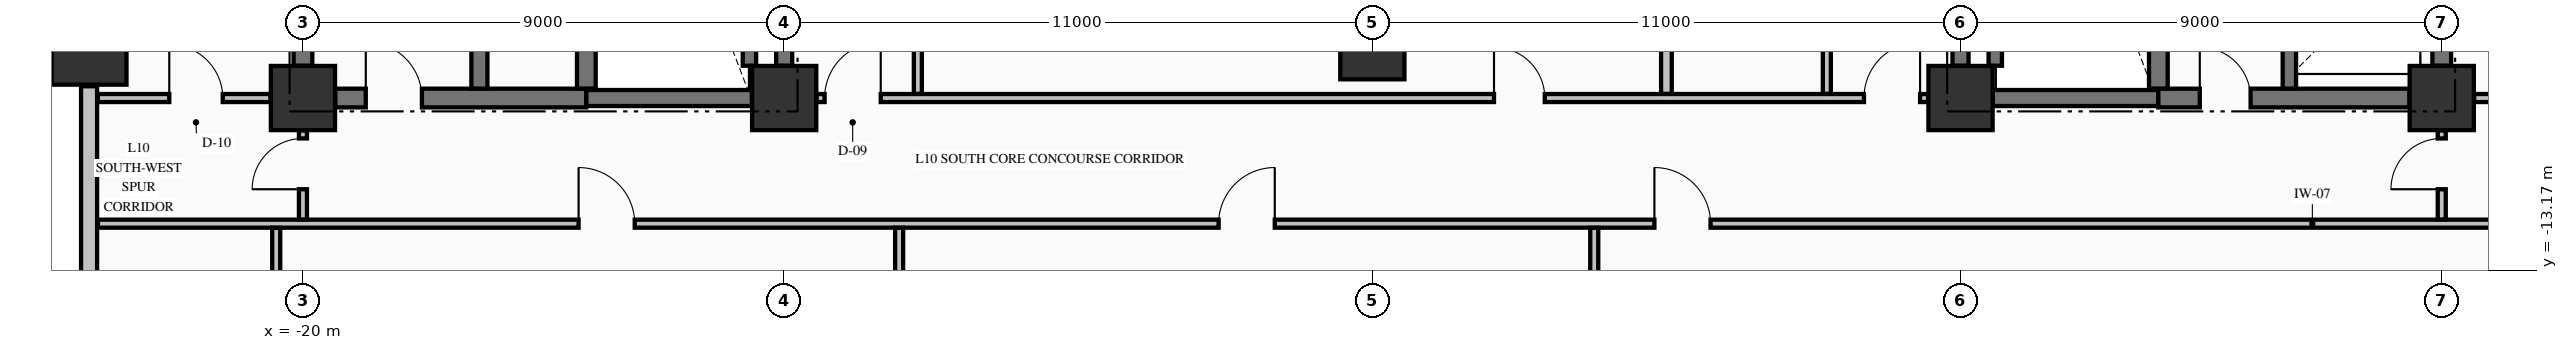
"""IFC4 building model, lengths in metres.
Left out: names, types, materials, properties, quantities, classifications, styles, units other than length and angle.
Written with IfcOpenShell. Run it as: python <this file> out.ifc"""

import sys

from ifc_helpers import new_model, si_unit, direction, frame, frame_2d, origin, origin_2d, place, context, subcontext, project, spatial, rectangle, extrude, element, fill, save


model = new_model("IFC4")
c1 = context("Model", 3, precision=1e-05, world=origin(), true_north=direction((0.0, 1.0)))
c2 = subcontext(c1, "Body", "Model", "MODEL_VIEW")
j1 = project(units=[si_unit("LENGTHUNIT", "METRE"), si_unit("PLANEANGLEUNIT", "RADIAN")], contexts=[c1])
p1 = place(None, origin())
s1 = spatial("IfcSite", under=j1, at=p1, CompositionType="ELEMENT")
p2 = place(p1, origin())
s2 = spatial("IfcBuilding", under=s1, at=p2, CompositionType="ELEMENT")
p3 = place(p2, frame((0.0, 0.0, 45.05)))
s3 = spatial("IfcBuildingStorey", under=s2, at=p3, CompositionType="ELEMENT", Elevation=45.05)
p4 = place(p3, frame((-24.0, -9.0, -0.25), z_axis=(0.0, 0.0, 1.0), x_axis=(1.0, 0.0, 0.0)))
e1 = element("IfcColumn", 1, at=p4, inside=s3, PredefinedType="COLUMN", context=c2, shape_type="SweptSolid", body=[
    extrude(rectangle(XDim=1.4, YDim=1.4, at=origin_2d()), origin(), (0.0, 0.0, 1.0), 3.57),
])
for number, where, z_axis, x_axis in (
    (2, (-20.0, -9.95, -0.25), (0.0, 0.0, 1.0), (1.0, 0.0, 0.0)),
    (3, (-11.0, -9.95, -0.25), (0.0, 0.0, 1.0), (1.0, 0.0, 0.0)),
    (4, (11.0, -9.95, -0.25), (0.0, 0.0, 1.0), (1.0, 0.0, 0.0)),
    (5, (20.0, -9.95, -0.25), (0.0, 0.0, 1.0), (1.0, 0.0, 0.0)),
    (6, (0.0, -9.0, -0.25), (0.0, 0.0, 1.0), (1.0, 0.0, 0.0)),
):
    element("IfcColumn", number, at=place(p3, frame(where, z_axis=z_axis, x_axis=x_axis)), inside=s3, PredefinedType="COLUMN", context=c2, shape_type="SweptSolid", body=[
        extrude(rectangle(XDim=1.2, YDim=1.2, at=origin_2d()), origin(), (0.0, 0.0, 1.0), 3.57),
    ])
p5 = place(p3, frame((-24.0, -9.73, 0.0), z_axis=(0.0, 0.0, 1.0), x_axis=(0.0, -1.0, 0.0)))
e7 = element("IfcWall", 7, at=p5, inside=s3, PredefinedType="STANDARD", context=c2, shape_type="SweptSolid", body=[
    extrude(rectangle(XDim=12.54, YDim=0.3, at=frame_2d((6.27, 0.0))), origin(), (0.0, 0.0, 1.0), 2.712),
])
p6 = place(p3, frame((-19.396, -9.95, 0.0), z_axis=(0.0, 0.0, 1.0), x_axis=(1.0, 0.0, 0.0)))
e8 = element("IfcWall", 8, at=p6, inside=s3, PredefinedType="SHEAR", context=c2, shape_type="SweptSolid", body=[
    extrude(rectangle(XDim=4.696, YDim=0.35, at=frame_2d((2.348, 0.0))), origin(), (0.0, 0.0, 1.0), 3.32),
])
p7 = place(p6, frame((0.571, 0.0, 0.0)))
e9 = element("IfcOpeningElement", 9, at=p7, cuts=e8, PredefinedType="OPENING", context=c2, shape_type="SweptSolid", body=[
    extrude(rectangle(XDim=1.05, YDim=2.15, at=frame_2d((0.525, 1.075))), frame((0.0, 0.185, 0.0), z_axis=(0.0, -1.0, 0.0), x_axis=(1.0, 0.0, 0.0)), (0.0, 0.0, 1.0), 0.37),
])
for number, where, z_axis, x_axis in (
    (10, (-14.7, -9.95, 0.0), (0.0, 0.0, 1.0), (1.0, 0.0, 0.0)),
    (11, (11.604, -9.95, 0.0), (0.0, 0.0, 1.0), (1.0, 0.0, 0.0)),
):
    element("IfcWall", number, at=place(p3, frame(where, z_axis=z_axis, x_axis=x_axis)), inside=s3, PredefinedType="SHEAR", context=c2, shape_type="SweptSolid", body=[
        extrude(rectangle(XDim=3.096, YDim=0.3, at=frame_2d((1.548, 0.0))), origin(), (0.0, 0.0, 1.0), 3.32),
    ])
p8 = place(p3, frame((14.7, -9.95, 0.0), z_axis=(0.0, 0.0, 1.0), x_axis=(1.0, 0.0, 0.0)))
e12 = element("IfcWall", 12, at=p8, inside=s3, PredefinedType="SHEAR", context=c2, shape_type="SweptSolid", body=[
    extrude(rectangle(XDim=4.696, YDim=0.35, at=frame_2d((2.348, 0.0))), origin(), (0.0, 0.0, 1.0), 3.32),
])
p9 = place(p8, frame((0.775, 0.0, 0.0)))
e13 = element("IfcOpeningElement", 13, at=p9, cuts=e12, PredefinedType="OPENING", context=c2, shape_type="SweptSolid", body=[
    extrude(rectangle(XDim=0.95, YDim=2.15, at=frame_2d((0.475, 1.075))), frame((0.0, 0.185, 0.0), z_axis=(0.0, -1.0, 0.0), x_axis=(1.0, 0.0, 0.0)), (0.0, 0.0, 1.0), 0.37),
])
p10 = place(p3, frame((-23.835, -12.3, 0.0), z_axis=(0.0, 0.0, 1.0), x_axis=(1.0, 0.0, 0.0)))
e14 = element("IfcWall", 14, at=p10, inside=s3, PredefinedType="PARTITIONING", context=c2, shape_type="SweptSolid", body=[
    extrude(rectangle(XDim=52.67, YDim=0.15, at=frame_2d((26.335, 0.0))), origin(), (0.0, 0.0, 1.0), 3.32),
])
p11 = place(p10, frame((8.99, 0.0, 0.0)))
e15 = element("IfcOpeningElement", 15, at=p11, cuts=e14, PredefinedType="OPENING", context=c2, shape_type="SweptSolid", body=[
    extrude(rectangle(XDim=1.05, YDim=2.15, at=frame_2d((0.525, 1.075))), frame((0.0, 0.085, 0.0), z_axis=(0.0, -1.0, 0.0), x_axis=(1.0, 0.0, 0.0)), (0.0, 0.0, 1.0), 0.17),
])
p12 = place(p10, frame((20.96, 0.0, 0.0)))
e16 = element("IfcOpeningElement", 16, at=p12, cuts=e14, PredefinedType="OPENING", context=c2, shape_type="SweptSolid", body=[
    extrude(rectangle(XDim=1.05, YDim=2.15, at=frame_2d((0.525, 1.075))), frame((0.0, 0.085, 0.0), z_axis=(0.0, -1.0, 0.0), x_axis=(1.0, 0.0, 0.0)), (0.0, 0.0, 1.0), 0.17),
])
p13 = place(p10, frame((29.11, 0.0, 0.0)))
e17 = element("IfcOpeningElement", 17, at=p13, cuts=e14, PredefinedType="OPENING", context=c2, shape_type="SweptSolid", body=[
    extrude(rectangle(XDim=1.05, YDim=2.15, at=frame_2d((0.525, 1.075))), frame((0.0, 0.085, 0.0), z_axis=(0.0, -1.0, 0.0), x_axis=(1.0, 0.0, 0.0)), (0.0, 0.0, 1.0), 0.17),
])
p14 = place(p3, frame((-23.835, -9.95, 0.0), z_axis=(0.0, 0.0, 1.0), x_axis=(1.0, 0.0, 0.0)))
e18 = element("IfcWall", 18, at=p14, inside=s3, PredefinedType="PARTITIONING", context=c2, shape_type="SweptSolid", body=[
    extrude(rectangle(XDim=3.229, YDim=0.15, at=frame_2d((1.615, 0.0))), origin(), (0.0, 0.0, 1.0), 3.32),
])
p15 = place(p14, frame((1.335, 0.0, 0.0)))
e19 = element("IfcOpeningElement", 19, at=p15, cuts=e18, PredefinedType="OPENING", context=c2, shape_type="SweptSolid", body=[
    extrude(rectangle(XDim=1.0, YDim=2.15, at=frame_2d((0.5, 1.075))), frame((0.0, 0.085, 0.0), z_axis=(0.0, -1.0, 0.0), x_axis=(1.0, 0.0, 0.0)), (0.0, 0.0, 1.0), 0.17),
])
p16 = place(p3, frame((-10.394, -9.95, 0.0), z_axis=(0.0, 0.0, 1.0), x_axis=(1.0, 0.0, 0.0)))
e20 = element("IfcWall", 20, at=p16, inside=s3, PredefinedType="PARTITIONING", context=c2, shape_type="SweptSolid", body=[
    extrude(rectangle(XDim=20.788, YDim=0.15, at=frame_2d((10.394, 0.0))), origin(), (0.0, 0.0, 1.0), 3.32),
])
p17 = place(p16, frame((0.15, 0.0, 0.0)))
e21 = element("IfcOpeningElement", 21, at=p17, cuts=e20, PredefinedType="OPENING", context=c2, shape_type="SweptSolid", body=[
    extrude(rectangle(XDim=1.05, YDim=2.15, at=frame_2d((0.525, 1.075))), frame((0.0, 0.085, 0.0), z_axis=(0.0, -1.0, 0.0), x_axis=(1.0, 0.0, 0.0)), (0.0, 0.0, 1.0), 0.17),
])
p18 = place(p16, frame((19.588, 0.0, 0.0)))
e22 = element("IfcOpeningElement", 22, at=p18, cuts=e20, PredefinedType="OPENING", context=c2, shape_type="SweptSolid", body=[
    extrude(rectangle(XDim=1.05, YDim=2.15, at=frame_2d((0.525, 1.075))), frame((0.0, 0.085, 0.0), z_axis=(0.0, -1.0, 0.0), x_axis=(1.0, 0.0, 0.0)), (0.0, 0.0, 1.0), 0.17),
])
p19 = place(p16, frame((12.669, 0.0, 0.0)))
e23 = element("IfcOpeningElement", 23, at=p19, cuts=e20, PredefinedType="OPENING", context=c2, shape_type="SweptSolid", body=[
    extrude(rectangle(XDim=0.95, YDim=2.15, at=frame_2d((0.475, 1.075))), frame((0.0, 0.085, 0.0), z_axis=(0.0, -1.0, 0.0), x_axis=(1.0, 0.0, 0.0)), (0.0, 0.0, 1.0), 0.17),
])
p20 = place(p3, frame((20.606, -9.95, 0.0), z_axis=(0.0, 0.0, 1.0), x_axis=(1.0, 0.0, 0.0)))
e24 = element("IfcWall", 24, at=p20, inside=s3, PredefinedType="PARTITIONING", context=c2, shape_type="SweptSolid", body=[
    extrude(rectangle(XDim=8.229, YDim=0.15, at=frame_2d((4.115, 0.0))), origin(), (0.0, 0.0, 1.0), 3.32),
])
p21 = place(p20, frame((3.419, 0.0, 0.0)))
e25 = element("IfcOpeningElement", 25, at=p21, cuts=e24, PredefinedType="OPENING", context=c2, shape_type="SweptSolid", body=[
    extrude(rectangle(XDim=0.95, YDim=2.15, at=frame_2d((0.475, 1.075))), frame((0.0, 0.085, 0.0), z_axis=(0.0, -1.0, 0.0), x_axis=(1.0, 0.0, 0.0)), (0.0, 0.0, 1.0), 0.17),
])
p22 = place(p3, frame((-20.0, -9.346, 0.0), z_axis=(0.0, 0.0, 1.0), x_axis=(0.0, 1.0, 0.0)))
e26 = element("IfcWall", 26, at=p22, inside=s3, PredefinedType="SHEAR", context=c2, shape_type="SweptSolid", body=[
    extrude(rectangle(XDim=8.742, YDim=0.35, at=frame_2d((4.371, 0.0))), origin(), (0.0, 0.0, 1.0), 3.32),
])
p23 = place(p3, frame((-16.7, -9.773, 0.0), z_axis=(0.0, 0.0, 1.0), x_axis=(0.0, 1.0, 0.0)))
e27 = element("IfcWall", 27, at=p23, inside=s3, PredefinedType="SHEAR", context=c2, shape_type="SweptSolid", body=[
    extrude(rectangle(XDim=9.371, YDim=0.3, at=frame_2d((4.686, 0.0))), origin(), (0.0, 0.0, 1.0), 3.32),
])
p24 = place(p3, frame((-14.7, -9.773, 0.0), z_axis=(0.0, 0.0, 1.0), x_axis=(0.0, 1.0, 0.0)))
e28 = element("IfcWall", 28, at=p24, inside=s3, PredefinedType="SHEAR", context=c2, shape_type="SweptSolid", body=[
    extrude(rectangle(XDim=9.371, YDim=0.35, at=frame_2d((4.686, 0.0))), origin(), (0.0, 0.0, 1.0), 3.32),
])
p25 = place(p3, frame((-11.65, -9.346, 0.0), z_axis=(0.0, 0.0, 1.0), x_axis=(0.0, 1.0, 0.0)))
e29 = element("IfcWall", 29, at=p25, inside=s3, PredefinedType="SOLIDWALL", context=c2, shape_type="SweptSolid", body=[
    extrude(rectangle(XDim=8.742, YDim=0.25, at=frame_2d((4.371, 0.0))), origin(), (0.0, 0.0, 1.0), 3.32),
])
for number, where, z_axis, x_axis in (
    (30, (-11.0, -9.346, 0.0), (0.0, 0.0, 1.0), (0.0, 1.0, 0.0)),
    (31, (11.0, -9.346, 0.0), (0.0, 0.0, 1.0), (0.0, 1.0, 0.0)),
):
    element("IfcWall", number, at=place(p3, frame(where, z_axis=z_axis, x_axis=x_axis)), inside=s3, PredefinedType="SHEAR", context=c2, shape_type="SweptSolid", body=[
        extrude(rectangle(XDim=8.742, YDim=0.3, at=frame_2d((4.371, 0.0))), origin(), (0.0, 0.0, 1.0), 3.32),
    ])
p26 = place(p3, frame((11.65, -9.346, 0.0), z_axis=(0.0, 0.0, 1.0), x_axis=(0.0, 1.0, 0.0)))
e32 = element("IfcWall", 32, at=p26, inside=s3, PredefinedType="SOLIDWALL", context=c2, shape_type="SweptSolid", body=[
    extrude(rectangle(XDim=8.742, YDim=0.25, at=frame_2d((4.371, 0.0))), origin(), (0.0, 0.0, 1.0), 3.32),
])
p27 = place(p3, frame((14.7, -9.773, 0.0), z_axis=(0.0, 0.0, 1.0), x_axis=(0.0, 1.0, 0.0)))
e33 = element("IfcWall", 33, at=p27, inside=s3, PredefinedType="SHEAR", context=c2, shape_type="SweptSolid", body=[
    extrude(rectangle(XDim=9.371, YDim=0.35, at=frame_2d((4.686, 0.0))), origin(), (0.0, 0.0, 1.0), 3.32),
])
p28 = place(p3, frame((17.15, -9.773, 0.0), z_axis=(0.0, 0.0, 1.0), x_axis=(0.0, 1.0, 0.0)))
e34 = element("IfcWall", 34, at=p28, inside=s3, PredefinedType="SOLIDWALL", context=c2, shape_type="SweptSolid", body=[
    extrude(rectangle(XDim=2.596, YDim=0.25, at=frame_2d((1.298, 0.0))), origin(), (0.0, 0.0, 1.0), 3.32),
])
p29 = place(p3, frame((20.0, -9.346, 0.0), z_axis=(0.0, 0.0, 1.0), x_axis=(0.0, 1.0, 0.0)))
e35 = element("IfcWall", 35, at=p29, inside=s3, PredefinedType="SHEAR", context=c2, shape_type="SweptSolid", body=[
    extrude(rectangle(XDim=2.169, YDim=0.35, at=frame_2d((1.084, 0.0))), origin(), (0.0, 0.0, 1.0), 3.32),
])
p30 = place(p3, frame((-20.5, -22.294, 0.0), z_axis=(0.0, 0.0, 1.0), x_axis=(0.0, 1.0, 0.0)))
e36 = element("IfcWall", 36, at=p30, inside=s3, PredefinedType="PARTITIONING", context=c2, shape_type="SweptSolid", body=[
    extrude(rectangle(XDim=9.916, YDim=0.15, at=frame_2d((4.958, 0.0))), origin(), (0.0, 0.0, 1.0), 3.32),
])
p31 = place(p3, frame((-20.0, -12.222, 0.0), z_axis=(0.0, 0.0, 1.0), x_axis=(0.0, 1.0, 0.0)))
e37 = element("IfcWall", 37, at=p31, inside=s3, PredefinedType="PARTITIONING", context=c2, shape_type="SweptSolid", body=[
    extrude(rectangle(XDim=1.666, YDim=0.15, at=frame_2d((0.833, 0.0))), origin(), (0.0, 0.0, 1.0), 3.32),
])
p32 = place(p31, frame((0.566, 0.0, 0.0)))
e38 = element("IfcOpeningElement", 38, at=p32, cuts=e37, PredefinedType="OPENING", context=c2, shape_type="SweptSolid", body=[
    extrude(rectangle(XDim=0.95, YDim=2.15, at=frame_2d((0.475, 1.075))), frame((0.0, 0.085, 0.0), z_axis=(0.0, -1.0, 0.0), x_axis=(1.0, 0.0, 0.0)), (0.0, 0.0, 1.0), 0.17),
])
p33 = place(p3, frame((-8.85, -26.335, 0.0), z_axis=(0.0, 0.0, 1.0), x_axis=(0.0, 1.0, 0.0)))
e39 = element("IfcWall", 39, at=p33, inside=s3, PredefinedType="PARTITIONING", context=c2, shape_type="SweptSolid", body=[
    extrude(rectangle(XDim=13.957, YDim=0.15, at=frame_2d((6.979, 0.0))), origin(), (0.0, 0.0, 1.0), 3.32),
])
p34 = place(p3, frame((-8.5, -9.872, 0.0), z_axis=(0.0, 0.0, 1.0), x_axis=(0.0, 1.0, 0.0)))
e40 = element("IfcWall", 40, at=p34, inside=s3, PredefinedType="PARTITIONING", context=c2, shape_type="SweptSolid", body=[
    extrude(rectangle(XDim=8.369, YDim=0.15, at=frame_2d((4.185, 0.0))), origin(), (0.0, 0.0, 1.0), 3.32),
])
p35 = place(p34, frame((3.727, 0.0, 0.0)))
e41 = element("IfcOpeningElement", 41, at=p35, cuts=e40, PredefinedType="OPENING", context=c2, shape_type="SweptSolid", body=[
    extrude(rectangle(XDim=0.95, YDim=2.15, at=frame_2d((0.475, 1.075))), frame((0.0, 0.085, 0.0), z_axis=(0.0, -1.0, 0.0), x_axis=(1.0, 0.0, 0.0)), (0.0, 0.0, 1.0), 0.17),
])
p36 = place(p3, frame((4.15, -26.335, 0.0), z_axis=(0.0, 0.0, 1.0), x_axis=(0.0, 1.0, 0.0)))
e42 = element("IfcWall", 42, at=p36, inside=s3, PredefinedType="PARTITIONING", context=c2, shape_type="SweptSolid", body=[
    extrude(rectangle(XDim=13.957, YDim=0.15, at=frame_2d((6.979, 0.0))), origin(), (0.0, 0.0, 1.0), 3.32),
])
p37 = place(p3, frame((5.5, -9.872, 0.0), z_axis=(0.0, 0.0, 1.0), x_axis=(0.0, 1.0, 0.0)))
e43 = element("IfcWall", 43, at=p37, inside=s3, PredefinedType="PARTITIONING", context=c2, shape_type="SweptSolid", body=[
    extrude(rectangle(XDim=4.969, YDim=0.2, at=frame_2d((2.484, 0.0))), origin(), (0.0, 0.0, 1.0), 3.32),
])
p38 = place(p3, frame((8.5, -9.872, 0.0), z_axis=(0.0, 0.0, 1.0), x_axis=(0.0, 1.0, 0.0)))
e44 = element("IfcWall", 44, at=p38, inside=s3, PredefinedType="PARTITIONING", context=c2, shape_type="SweptSolid", body=[
    extrude(rectangle(XDim=4.969, YDim=0.15, at=frame_2d((2.484, 0.0))), origin(), (0.0, 0.0, 1.0), 3.32),
])
p39 = place(p38, frame((1.997, 0.0, 0.0)))
e45 = element("IfcOpeningElement", 45, at=p39, cuts=e44, PredefinedType="OPENING", context=c2, shape_type="SweptSolid", body=[
    extrude(rectangle(XDim=0.95, YDim=2.15, at=frame_2d((0.475, 1.075))), frame((0.0, 0.085, 0.0), z_axis=(0.0, -1.0, 0.0), x_axis=(1.0, 0.0, 0.0)), (0.0, 0.0, 1.0), 0.17),
])
p40 = place(p3, frame((20.0, -12.222, 0.0), z_axis=(0.0, 0.0, 1.0), x_axis=(0.0, 1.0, 0.0)))
e46 = element("IfcWall", 46, at=p40, inside=s3, PredefinedType="PARTITIONING", context=c2, shape_type="SweptSolid", body=[
    extrude(rectangle(XDim=1.666, YDim=0.15, at=frame_2d((0.833, 0.0))), origin(), (0.0, 0.0, 1.0), 2.66),
])
p41 = place(p40, frame((0.566, 0.0, 0.0)))
e47 = element("IfcOpeningElement", 47, at=p41, cuts=e46, PredefinedType="OPENING", context=c2, shape_type="SweptSolid", body=[
    extrude(rectangle(XDim=0.95, YDim=2.15, at=frame_2d((0.475, 1.075))), frame((0.0, 0.085, 0.0), z_axis=(0.0, -1.0, 0.0), x_axis=(1.0, 0.0, 0.0)), (0.0, 0.0, 1.0), 0.17),
])
p42 = place(p7, origin())
e48 = element("IfcDoor", 48, at=p42, inside=s3, OperationType="SINGLE_SWING_LEFT", PredefinedType="DOOR", context=c2, shape_type="SweptSolid", body=[
    extrude(rectangle(XDim=1.05, YDim=2.15, at=frame_2d((0.525, 1.075))), frame((0.0, 0.025, 0.0), z_axis=(0.0, -1.0, 0.0), x_axis=(1.0, 0.0, 0.0)), (0.0, 0.0, 1.0), 0.05),
])
fill(e9, e48)
p43 = place(p9, origin())
e49 = element("IfcDoor", 49, at=p43, inside=s3, OperationType="SINGLE_SWING_LEFT", PredefinedType="DOOR", context=c2, shape_type="SweptSolid", body=[
    extrude(rectangle(XDim=0.95, YDim=2.15, at=frame_2d((0.475, 1.075))), frame((0.0, 0.025, 0.0), z_axis=(0.0, -1.0, 0.0), x_axis=(1.0, 0.0, 0.0)), (0.0, 0.0, 1.0), 0.05),
])
fill(e13, e49)
p44 = place(p17, origin())
e50 = element("IfcDoor", 50, at=p44, inside=s3, OperationType="SINGLE_SWING_RIGHT", PredefinedType="DOOR", context=c2, shape_type="SweptSolid", body=[
    extrude(rectangle(XDim=1.05, YDim=2.15, at=frame_2d((0.525, 1.075))), frame((0.0, 0.025, 0.0), z_axis=(0.0, -1.0, 0.0), x_axis=(1.0, 0.0, 0.0)), (0.0, 0.0, 1.0), 0.05),
])
fill(e21, e50)
p45 = place(p18, origin())
e51 = element("IfcDoor", 51, at=p45, inside=s3, OperationType="SINGLE_SWING_RIGHT", PredefinedType="DOOR", context=c2, shape_type="SweptSolid", body=[
    extrude(rectangle(XDim=1.05, YDim=2.15, at=frame_2d((0.525, 1.075))), frame((0.0, 0.025, 0.0), z_axis=(0.0, -1.0, 0.0), x_axis=(1.0, 0.0, 0.0)), (0.0, 0.0, 1.0), 0.05),
])
fill(e22, e51)
p46 = place(p11, origin())
e52 = element("IfcDoor", 52, at=p46, inside=s3, OperationType="SINGLE_SWING_LEFT", PredefinedType="DOOR", context=c2, shape_type="SweptSolid", body=[
    extrude(rectangle(XDim=1.05, YDim=2.15, at=frame_2d((0.525, 1.075))), frame((0.0, 0.025, 0.0), z_axis=(0.0, -1.0, 0.0), x_axis=(1.0, 0.0, 0.0)), (0.0, 0.0, 1.0), 0.05),
])
fill(e15, e52)
p47 = place(p12, origin())
e53 = element("IfcDoor", 53, at=p47, inside=s3, OperationType="SINGLE_SWING_RIGHT", PredefinedType="DOOR", context=c2, shape_type="SweptSolid", body=[
    extrude(rectangle(XDim=1.05, YDim=2.15, at=frame_2d((0.525, 1.075))), frame((0.0, 0.025, 0.0), z_axis=(0.0, -1.0, 0.0), x_axis=(1.0, 0.0, 0.0)), (0.0, 0.0, 1.0), 0.05),
])
fill(e16, e53)
p48 = place(p13, origin())
e54 = element("IfcDoor", 54, at=p48, inside=s3, OperationType="SINGLE_SWING_LEFT", PredefinedType="DOOR", context=c2, shape_type="SweptSolid", body=[
    extrude(rectangle(XDim=1.05, YDim=2.15, at=frame_2d((0.525, 1.075))), frame((0.0, 0.025, 0.0), z_axis=(0.0, -1.0, 0.0), x_axis=(1.0, 0.0, 0.0)), (0.0, 0.0, 1.0), 0.05),
])
fill(e17, e54)
p49 = place(p19, origin())
e55 = element("IfcDoor", 55, at=p49, inside=s3, OperationType="SINGLE_SWING_LEFT", PredefinedType="DOOR", context=c2, shape_type="SweptSolid", body=[
    extrude(rectangle(XDim=0.95, YDim=2.15, at=frame_2d((0.475, 1.075))), frame((0.0, 0.025, 0.0), z_axis=(0.0, -1.0, 0.0), x_axis=(1.0, 0.0, 0.0)), (0.0, 0.0, 1.0), 0.05),
])
fill(e23, e55)
p50 = place(p32, origin())
e56 = element("IfcDoor", 56, at=p50, inside=s3, OperationType="SINGLE_SWING_LEFT", PredefinedType="DOOR", context=c2, shape_type="SweptSolid", body=[
    extrude(rectangle(XDim=0.95, YDim=2.15, at=frame_2d((0.475, 1.075))), frame((0.0, 0.025, 0.0), z_axis=(0.0, -1.0, 0.0), x_axis=(1.0, 0.0, 0.0)), (0.0, 0.0, 1.0), 0.05),
])
fill(e38, e56)
p51 = place(p15, origin())
e57 = element("IfcDoor", 57, at=p51, inside=s3, OperationType="SINGLE_SWING_LEFT", PredefinedType="DOOR", context=c2, shape_type="SweptSolid", body=[
    extrude(rectangle(XDim=1.0, YDim=2.15, at=frame_2d((0.5, 1.075))), frame((0.0, 0.025, 0.0), z_axis=(0.0, -1.0, 0.0), x_axis=(1.0, 0.0, 0.0)), (0.0, 0.0, 1.0), 0.05),
])
fill(e19, e57)
p52 = place(p41, origin())
e58 = element("IfcDoor", 58, at=p52, inside=s3, OperationType="SINGLE_SWING_LEFT", PredefinedType="DOOR", context=c2, shape_type="SweptSolid", body=[
    extrude(rectangle(XDim=0.95, YDim=2.15, at=frame_2d((0.475, 1.075))), frame((0.0, 0.025, 0.0), z_axis=(0.0, -1.0, 0.0), x_axis=(1.0, 0.0, 0.0)), (0.0, 0.0, 1.0), 0.05),
])
fill(e47, e58)
save(model, sys.argv[1])
